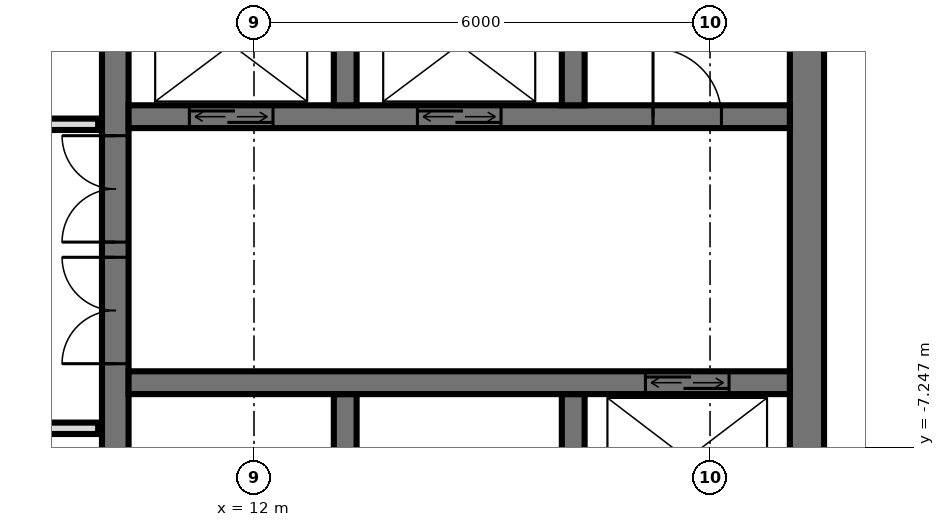
"""IFC4 building model, lengths in metres.
Left out: names, types, materials, properties, quantities, classifications, styles, units other than length and angle.
Written with IfcOpenShell. Run it as: python <this file> out.ifc"""

import sys

from ifc_helpers import new_model, si_unit, direction, frame, frame_2d, origin, place, context, subcontext, project, spatial, rectangle, extrude, element, fill, save


model = new_model("IFC4")
c1 = context("Model", 3, precision=1e-05, world=origin(), true_north=direction((0.0, 1.0)))
c2 = subcontext(c1, "Body", "Model", "MODEL_VIEW")
j1 = project(units=[si_unit("LENGTHUNIT", "METRE"), si_unit("PLANEANGLEUNIT", "RADIAN")], contexts=[c1])
p1 = place(None, origin())
s1 = spatial("IfcSite", under=j1, at=p1, CompositionType="ELEMENT")
p2 = place(p1, origin())
s2 = spatial("IfcBuilding", under=s1, at=p2, CompositionType="ELEMENT")
p3 = place(p2, frame((0.0, 0.0, 314.6)))
s3 = spatial("IfcBuildingStorey", under=s2, at=p3, CompositionType="ELEMENT", Elevation=314.6)
p4 = place(p3, frame((10.175, -14.55, 0.0), z_axis=(0.0, 0.0, 1.0), x_axis=(0.0, 1.0, 0.0)))
e1 = element("IfcWall", 1, at=p4, inside=s3, PredefinedType="SHEAR", context=c2, shape_type="SweptSolid", body=[
    extrude(rectangle(XDim=14.1, YDim=0.35, at=frame_2d((7.05, 0.0))), origin(), (0.0, 0.0, 1.0), 4.0),
])
p5 = place(p4, frame((8.4, 0.0, 0.0)))
e2 = element("IfcOpeningElement", 2, at=p5, cuts=e1, PredefinedType="OPENING", context=c2, shape_type="SweptSolid", body=[
    extrude(rectangle(XDim=1.4, YDim=2.4, at=frame_2d((0.7, 1.2))), frame((0.0, 0.185, 0.0), z_axis=(0.0, -1.0, 0.0), x_axis=(1.0, 0.0, 0.0)), (0.0, 0.0, 1.0), 0.37),
])
p6 = place(p4, frame((10.0, 0.0, 0.0)))
e3 = element("IfcOpeningElement", 3, at=p6, cuts=e1, PredefinedType="OPENING", context=c2, shape_type="SweptSolid", body=[
    extrude(rectangle(XDim=1.4, YDim=2.4, at=frame_2d((0.7, 1.2))), frame((0.0, 0.185, 0.0), z_axis=(0.0, -1.0, 0.0), x_axis=(1.0, 0.0, 0.0)), (0.0, 0.0, 1.0), 0.37),
])
p7 = place(p4, frame((4.0, 0.0, 0.0)))
e4 = element("IfcOpeningElement", 4, at=p7, cuts=e1, PredefinedType="OPENING", context=c2, shape_type="SweptSolid", body=[
    extrude(rectangle(XDim=1.2, YDim=2.1, at=frame_2d((0.6, 1.05))), frame((0.0, 0.185, 0.0), z_axis=(0.0, -1.0, 0.0), x_axis=(1.0, 0.0, 0.0)), (0.0, 0.0, 1.0), 0.37),
])
p8 = place(p3, frame((19.275, -14.55, 0.0), z_axis=(0.0, 0.0, 1.0), x_axis=(0.0, 1.0, 0.0)))
e5 = element("IfcWall", 5, at=p8, inside=s3, PredefinedType="SHEAR", context=c2, shape_type="SweptSolid", body=[
    extrude(rectangle(XDim=14.1, YDim=0.45, at=frame_2d((7.05, 0.0))), origin(), (0.0, 0.0, 1.0), 4.0),
])
p9 = place(p3, frame((10.35, -2.9, 0.0), z_axis=(0.0, 0.0, 1.0), x_axis=(1.0, 0.0, 0.0)))
e6 = element("IfcWall", 6, at=p9, inside=s3, PredefinedType="SHEAR", context=c2, shape_type="SweptSolid", body=[
    extrude(rectangle(XDim=8.7, YDim=0.3, at=frame_2d((4.35, 0.0))), origin(), (0.0, 0.0, 1.0), 4.0),
])
p10 = place(p9, frame((0.8, 0.0, 0.0)))
e7 = element("IfcOpeningElement", 7, at=p10, cuts=e6, PredefinedType="OPENING", context=c2, shape_type="SweptSolid", body=[
    extrude(rectangle(XDim=1.1, YDim=2.1, at=frame_2d((0.55, 1.05))), frame((0.0, 0.16, 0.0), z_axis=(0.0, -1.0, 0.0), x_axis=(1.0, 0.0, 0.0)), (0.0, 0.0, 1.0), 0.32),
])
p11 = place(p9, frame((3.8, 0.0, 0.0)))
e8 = element("IfcOpeningElement", 8, at=p11, cuts=e6, PredefinedType="OPENING", context=c2, shape_type="SweptSolid", body=[
    extrude(rectangle(XDim=1.1, YDim=2.1, at=frame_2d((0.55, 1.05))), frame((0.0, 0.16, 0.0), z_axis=(0.0, -1.0, 0.0), x_axis=(1.0, 0.0, 0.0)), (0.0, 0.0, 1.0), 0.32),
])
p12 = place(p9, frame((6.9, 0.0, 0.0)))
e9 = element("IfcOpeningElement", 9, at=p12, cuts=e6, PredefinedType="OPENING", context=c2, shape_type="SweptSolid", body=[
    extrude(rectangle(XDim=0.9, YDim=2.1, at=frame_2d((0.45, 1.05))), frame((0.0, 0.16, 0.0), z_axis=(0.0, -1.0, 0.0), x_axis=(1.0, 0.0, 0.0)), (0.0, 0.0, 1.0), 0.32),
])
p13 = place(p3, frame((10.35, -6.4, 0.0), z_axis=(0.0, 0.0, 1.0), x_axis=(1.0, 0.0, 0.0)))
e10 = element("IfcWall", 10, at=p13, inside=s3, PredefinedType="SHEAR", context=c2, shape_type="SweptSolid", body=[
    extrude(rectangle(XDim=8.7, YDim=0.3, at=frame_2d((4.35, 0.0))), origin(), (0.0, 0.0, 1.0), 4.0),
])
p14 = place(p13, frame((6.8, 0.0, 0.0)))
e11 = element("IfcOpeningElement", 11, at=p14, cuts=e10, PredefinedType="OPENING", context=c2, shape_type="SweptSolid", body=[
    extrude(rectangle(XDim=1.1, YDim=2.1, at=frame_2d((0.55, 1.05))), frame((0.0, 0.16, 0.0), z_axis=(0.0, -1.0, 0.0), x_axis=(1.0, 0.0, 0.0)), (0.0, 0.0, 1.0), 0.32),
])
for number, where, z_axis, x_axis in (
    (12, (13.2, -2.75, 0.0), (0.0, 0.0, 1.0), (0.0, 1.0, 0.0)),
    (13, (13.2, -8.85, 0.0), (0.0, 0.0, 1.0), (0.0, 1.0, 0.0)),
    (14, (16.2, -2.75, 0.0), (0.0, 0.0, 1.0), (0.0, 1.0, 0.0)),
    (15, (16.2, -8.85, 0.0), (0.0, 0.0, 1.0), (0.0, 1.0, 0.0)),
):
    element("IfcWall", number, at=place(p3, frame(where, z_axis=z_axis, x_axis=x_axis)), inside=s3, PredefinedType="SHEAR", context=c2, shape_type="SweptSolid", body=[
        extrude(rectangle(XDim=2.3, YDim=0.3, at=frame_2d((1.15, 0.0))), origin(), (0.0, 0.0, 1.0), 4.0),
    ])
p15 = place(p3, frame((-9.95, -7.0, 0.0), z_axis=(0.0, 0.0, 1.0), x_axis=(1.0, 0.0, 0.0)))
e16 = element("IfcWall", 16, at=p15, inside=s3, PredefinedType="PARTITIONING", context=c2, shape_type="SweptSolid", body=[
    extrude(rectangle(XDim=19.9, YDim=0.15, at=frame_2d((9.95, 0.0))), origin(), (0.0, 0.0, 1.0), 3.72),
])
p16 = place(p15, frame((9.45, 0.0, 0.0)))
e17 = element("IfcOpeningElement", 17, at=p16, cuts=e16, PredefinedType="OPENING", context=c2, shape_type="SweptSolid", body=[
    extrude(rectangle(XDim=1.0, YDim=2.1, at=frame_2d((0.5, 1.05))), frame((0.0, 0.085, 0.0), z_axis=(0.0, -1.0, 0.0), x_axis=(1.0, 0.0, 0.0)), (0.0, 0.0, 1.0), 0.17),
])
p17 = place(p15, frame((3.45, 0.0, 0.0)))
e18 = element("IfcOpeningElement", 18, at=p17, cuts=e16, PredefinedType="OPENING", context=c2, shape_type="SweptSolid", body=[
    extrude(rectangle(XDim=1.0, YDim=2.1, at=frame_2d((0.5, 1.05))), frame((0.0, 0.085, 0.0), z_axis=(0.0, -1.0, 0.0), x_axis=(1.0, 0.0, 0.0)), (0.0, 0.0, 1.0), 0.17),
])
p18 = place(p3, frame((-9.95, -3.0, 0.0), z_axis=(0.0, 0.0, 1.0), x_axis=(1.0, 0.0, 0.0)))
e19 = element("IfcWall", 19, at=p18, inside=s3, PredefinedType="PARTITIONING", context=c2, shape_type="SweptSolid", body=[
    extrude(rectangle(XDim=19.9, YDim=0.15, at=frame_2d((9.95, 0.0))), origin(), (0.0, 0.0, 1.0), 3.72),
])
p19 = place(p18, frame((0.95, 0.0, 0.0)))
e20 = element("IfcOpeningElement", 20, at=p19, cuts=e19, PredefinedType="OPENING", context=c2, shape_type="SweptSolid", body=[
    extrude(rectangle(XDim=1.0, YDim=2.1, at=frame_2d((0.5, 1.05))), frame((0.0, 0.085, 0.0), z_axis=(0.0, -1.0, 0.0), x_axis=(1.0, 0.0, 0.0)), (0.0, 0.0, 1.0), 0.17),
])
p20 = place(p18, frame((3.7, 0.0, 0.0)))
e21 = element("IfcOpeningElement", 21, at=p20, cuts=e19, PredefinedType="OPENING", context=c2, shape_type="SweptSolid", body=[
    extrude(rectangle(XDim=1.0, YDim=2.1, at=frame_2d((0.5, 1.05))), frame((0.0, 0.085, 0.0), z_axis=(0.0, -1.0, 0.0), x_axis=(1.0, 0.0, 0.0)), (0.0, 0.0, 1.0), 0.17),
])
p21 = place(p18, frame((8.45, 0.0, 0.0)))
e22 = element("IfcOpeningElement", 22, at=p21, cuts=e19, PredefinedType="OPENING", context=c2, shape_type="SweptSolid", body=[
    extrude(rectangle(XDim=1.0, YDim=2.1, at=frame_2d((0.5, 1.05))), frame((0.0, 0.085, 0.0), z_axis=(0.0, -1.0, 0.0), x_axis=(1.0, 0.0, 0.0)), (0.0, 0.0, 1.0), 0.17),
])
p22 = place(p18, frame((15.7, 0.0, 0.0)))
e23 = element("IfcOpeningElement", 23, at=p22, cuts=e19, PredefinedType="OPENING", context=c2, shape_type="SweptSolid", body=[
    extrude(rectangle(XDim=1.0, YDim=2.1, at=frame_2d((0.5, 1.05))), frame((0.0, 0.085, 0.0), z_axis=(0.0, -1.0, 0.0), x_axis=(1.0, 0.0, 0.0)), (0.0, 0.0, 1.0), 0.17),
])
p23 = place(p10, origin())
e24 = element("IfcDoor", 24, at=p23, inside=s3, OperationType="DOUBLE_DOOR_SLIDING", PredefinedType="USERDEFINED", context=c2, shape_type="SweptSolid", body=[
    extrude(rectangle(XDim=1.1, YDim=2.1, at=frame_2d((0.55, 1.05))), frame((0.0, 0.025, 0.0), z_axis=(0.0, -1.0, 0.0), x_axis=(1.0, 0.0, 0.0)), (0.0, 0.0, 1.0), 0.05),
])
fill(e7, e24)
p24 = place(p11, origin())
e25 = element("IfcDoor", 25, at=p24, inside=s3, OperationType="DOUBLE_DOOR_SLIDING", PredefinedType="USERDEFINED", context=c2, shape_type="SweptSolid", body=[
    extrude(rectangle(XDim=1.1, YDim=2.1, at=frame_2d((0.55, 1.05))), frame((0.0, 0.025, 0.0), z_axis=(0.0, -1.0, 0.0), x_axis=(1.0, 0.0, 0.0)), (0.0, 0.0, 1.0), 0.05),
])
fill(e8, e25)
p25 = place(p14, origin())
e26 = element("IfcDoor", 26, at=p25, inside=s3, OperationType="DOUBLE_DOOR_SLIDING", PredefinedType="USERDEFINED", context=c2, shape_type="SweptSolid", body=[
    extrude(rectangle(XDim=1.1, YDim=2.1, at=frame_2d((0.55, 1.05))), frame((0.0, 0.025, 0.0), z_axis=(0.0, -1.0, 0.0), x_axis=(1.0, 0.0, 0.0)), (0.0, 0.0, 1.0), 0.05),
])
fill(e11, e26)
p26 = place(p5, origin())
e27 = element("IfcDoor", 27, at=p26, inside=s3, OperationType="DOUBLE_DOOR_SINGLE_SWING", PredefinedType="DOOR", context=c2, shape_type="SweptSolid", body=[
    extrude(rectangle(XDim=1.4, YDim=2.4, at=frame_2d((0.7, 1.2))), frame((0.0, 0.025, 0.0), z_axis=(0.0, -1.0, 0.0), x_axis=(1.0, 0.0, 0.0)), (0.0, 0.0, 1.0), 0.05),
])
fill(e2, e27)
p27 = place(p6, origin())
e28 = element("IfcDoor", 28, at=p27, inside=s3, OperationType="DOUBLE_DOOR_SINGLE_SWING", PredefinedType="DOOR", context=c2, shape_type="SweptSolid", body=[
    extrude(rectangle(XDim=1.4, YDim=2.4, at=frame_2d((0.7, 1.2))), frame((0.0, 0.025, 0.0), z_axis=(0.0, -1.0, 0.0), x_axis=(1.0, 0.0, 0.0)), (0.0, 0.0, 1.0), 0.05),
])
fill(e3, e28)
p28 = place(p12, origin())
e29 = element("IfcDoor", 29, at=p28, inside=s3, OperationType="SINGLE_SWING_RIGHT", PredefinedType="DOOR", context=c2, shape_type="SweptSolid", body=[
    extrude(rectangle(XDim=0.9, YDim=2.1, at=frame_2d((0.45, 1.05))), frame((0.0, 0.025, 0.0), z_axis=(0.0, -1.0, 0.0), x_axis=(1.0, 0.0, 0.0)), (0.0, 0.0, 1.0), 0.05),
])
fill(e9, e29)
save(model, sys.argv[1])
